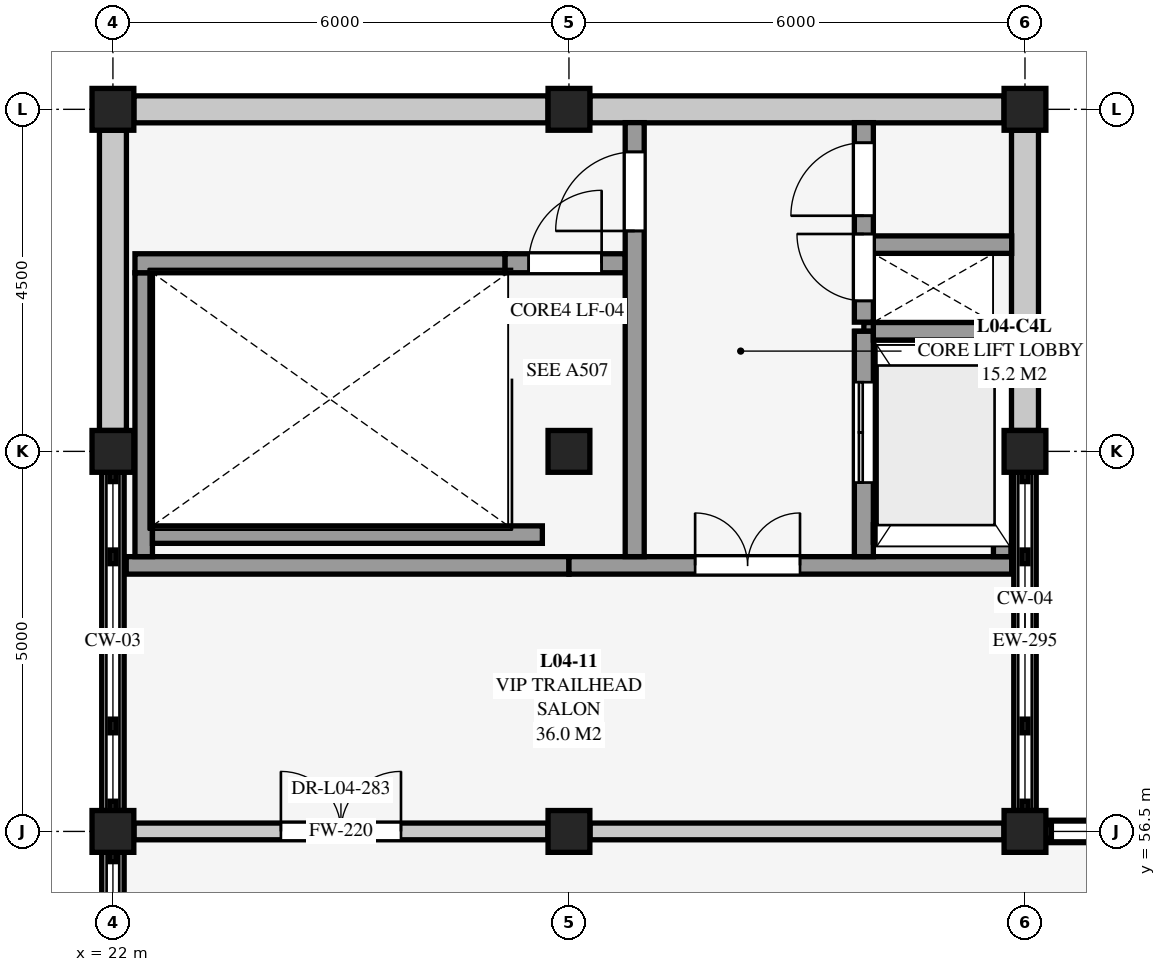
"""IFC4 building model, lengths in metres.
Left out: names, types, materials, properties, quantities, classifications, styles, units other than length and angle.
Written with IfcOpenShell. Run it as: python <this file> out.ifc"""

import sys

from ifc_helpers import new_model, si_unit, direction, frame, frame_2d, origin, origin_2d, place, context, subcontext, project, spatial, rectangle, extrude, element, fill, save


model = new_model("IFC4")
c1 = context("Model", 3, precision=1e-05, world=origin(), true_north=direction((0.0, 1.0)))
c2 = subcontext(c1, "Body", "Model", "MODEL_VIEW")
j1 = project(units=[si_unit("LENGTHUNIT", "METRE"), si_unit("PLANEANGLEUNIT", "RADIAN")], contexts=[c1])
p1 = place(None, origin())
s1 = spatial("IfcSite", under=j1, at=p1, CompositionType="ELEMENT")
p2 = place(p1, origin())
s2 = spatial("IfcBuilding", under=s1, at=p2, CompositionType="ELEMENT")
p3 = place(p2, frame((0.0, 0.0, 13.5)))
s3 = spatial("IfcBuildingStorey", under=s2, at=p3, CompositionType="ELEMENT", Elevation=13.5)
for number, where, z_axis, x_axis in (
    (1, (22.0, 56.5, 0.0), (0.0, 0.0, 1.0), (1.0, 0.0, 0.0)),
    (2, (22.0, 61.5, 0.0), (0.0, 0.0, 1.0), (1.0, 0.0, 0.0)),
    (3, (22.0, 66.0, 0.0), (0.0, 0.0, 1.0), (1.0, 0.0, 0.0)),
    (4, (28.0, 56.5, 0.0), (0.0, 0.0, 1.0), (1.0, 0.0, 0.0)),
    (5, (28.0, 61.5, 0.0), (0.0, 0.0, 1.0), (1.0, 0.0, 0.0)),
    (6, (28.0, 66.0, 0.0), (0.0, 0.0, 1.0), (1.0, 0.0, 0.0)),
    (7, (34.0, 56.5, 0.0), (0.0, 0.0, 1.0), (1.0, 0.0, 0.0)),
    (8, (34.0, 61.5, 0.0), (0.0, 0.0, 1.0), (1.0, 0.0, 0.0)),
    (9, (34.0, 66.0, 0.0), (0.0, 0.0, 1.0), (1.0, 0.0, 0.0)),
):
    element("IfcColumn", number, at=place(p3, frame(where, z_axis=z_axis, x_axis=x_axis)), inside=s3, PredefinedType="COLUMN", context=c2, shape_type="SweptSolid", body=[
        extrude(rectangle(XDim=0.55, YDim=0.55, at=origin_2d()), origin(), (0.0, 0.0, 1.0), 4.5),
    ])
p4 = place(p3, frame((34.275, 56.5, 0.0), z_axis=(0.0, 0.0, 1.0), x_axis=(1.0, 0.0, 0.0)))
e10 = element("IfcWall", 10, at=p4, inside=s3, PredefinedType="SOLIDWALL", context=c2, shape_type="SweptSolid", body=[
    extrude(rectangle(XDim=5.45, YDim=0.295, at=frame_2d((2.725, 0.0))), origin(), (0.0, 0.0, 1.0), 0.41),
])
p5 = place(p3, frame((22.0, 51.275, 0.0), z_axis=(0.0, 0.0, 1.0), x_axis=(0.0, 1.0, 0.0)))
e11 = element("IfcWall", 11, at=p5, inside=s3, PredefinedType="SOLIDWALL", context=c2, shape_type="SweptSolid", body=[
    extrude(rectangle(XDim=4.95, YDim=0.295, at=frame_2d((2.475, 0.0))), origin(), (0.0, 0.0, 1.0), 0.21),
])
for number, where, z_axis, x_axis in (
    (12, (22.275, 66.0, 0.0), (0.0, 0.0, 1.0), (1.0, 0.0, 0.0)),
    (13, (28.275, 66.0, 0.0), (0.0, 0.0, 1.0), (1.0, 0.0, 0.0)),
):
    element("IfcWall", number, at=place(p3, frame(where, z_axis=z_axis, x_axis=x_axis)), inside=s3, PredefinedType="SOLIDWALL", context=c2, shape_type="SweptSolid", body=[
        extrude(rectangle(XDim=5.45, YDim=0.355, at=frame_2d((2.725, 0.0))), origin(), (0.0, 0.0, 1.0), 3.843),
    ])
p6 = place(p3, frame((22.0, 56.775, 0.0), z_axis=(0.0, 0.0, 1.0), x_axis=(0.0, 1.0, 0.0)))
e14 = element("IfcWall", 14, at=p6, inside=s3, PredefinedType="SOLIDWALL", context=c2, shape_type="SweptSolid", body=[
    extrude(rectangle(XDim=4.45, YDim=0.295, at=frame_2d((2.225, 0.0))), origin(), (0.0, 0.0, 1.0), 0.26),
])
p7 = place(p3, frame((34.0, 61.225, 0.0), z_axis=(0.0, 0.0, 1.0), x_axis=(0.0, -1.0, 0.0)))
e15 = element("IfcWall", 15, at=p7, inside=s3, PredefinedType="SOLIDWALL", context=c2, shape_type="SweptSolid", body=[
    extrude(rectangle(XDim=4.45, YDim=0.295, at=frame_2d((2.225, 0.0))), origin(), (0.0, 0.0, 1.0), 0.31),
])
for number, where, z_axis, x_axis in (
    (16, (22.0, 61.775, 0.0), (0.0, 0.0, 1.0), (0.0, 1.0, 0.0)),
    (17, (34.0, 65.725, 0.0), (0.0, 0.0, 1.0), (0.0, -1.0, 0.0)),
):
    element("IfcWall", number, at=place(p3, frame(where, z_axis=z_axis, x_axis=x_axis)), inside=s3, PredefinedType="SOLIDWALL", context=c2, shape_type="SweptSolid", body=[
        extrude(rectangle(XDim=3.95, YDim=0.355, at=frame_2d((1.975, 0.0))), origin(), (0.0, 0.0, 1.0), 3.843),
    ])
p8 = place(p3, frame((31.88, 60.42, 4.5), z_axis=(0.0, 0.0, 1.0), x_axis=(1.0, 0.0, 0.0)))
e18 = element("IfcWall", 18, at=p8, inside=s3, PredefinedType="SHEAR", context=c2, shape_type="SweptSolid", body=[
    extrude(rectangle(XDim=1.82, YDim=0.23, at=frame_2d((0.91, 0.0))), origin(), (0.0, 0.0, 1.0), 1.25),
])
p9 = place(p3, frame((33.7, 60.42, 4.5), z_axis=(0.0, 0.0, 1.0), x_axis=(0.0, 1.0, 0.0)))
e19 = element("IfcWall", 19, at=p9, inside=s3, PredefinedType="SHEAR", context=c2, shape_type="SweptSolid", body=[
    extrude(rectangle(XDim=2.66, YDim=0.23, at=frame_2d((1.33, 0.0))), origin(), (0.0, 0.0, 1.0), 1.25),
])
p10 = place(p3, frame((33.7, 63.08, 4.5), z_axis=(0.0, 0.0, 1.0), x_axis=(-1.0, 0.0, 0.0)))
e20 = element("IfcWall", 20, at=p10, inside=s3, PredefinedType="SHEAR", context=c2, shape_type="SweptSolid", body=[
    extrude(rectangle(XDim=1.82, YDim=0.23, at=frame_2d((0.91, 0.0))), origin(), (0.0, 0.0, 1.0), 1.25),
])
p11 = place(p3, frame((31.88, 63.08, 4.5), z_axis=(0.0, 0.0, 1.0), x_axis=(0.0, -1.0, 0.0)))
e21 = element("IfcWall", 21, at=p11, inside=s3, PredefinedType="SHEAR", context=c2, shape_type="SweptSolid", body=[
    extrude(rectangle(XDim=2.66, YDim=0.23, at=frame_2d((1.33, 0.0))), origin(), (0.0, 0.0, 1.0), 1.25),
])
p12 = place(p3, frame((22.175, 60.0, 0.0), z_axis=(0.0, 0.0, 1.0), x_axis=(1.0, 0.0, 0.0)))
e22 = element("IfcWall", 22, at=p12, inside=s3, PredefinedType="SHEAR", context=c2, shape_type="SweptSolid", body=[
    extrude(rectangle(XDim=5.825, YDim=0.23, at=frame_2d((2.913, 0.0))), origin(), (0.0, 0.0, 1.0), 4.24),
])
p13 = place(p3, frame((28.0, 60.0, 0.0), z_axis=(0.0, 0.0, 1.0), x_axis=(1.0, 0.0, 0.0)))
e23 = element("IfcWall", 23, at=p13, inside=s3, PredefinedType="SHEAR", context=c2, shape_type="SweptSolid", body=[
    extrude(rectangle(XDim=5.825, YDim=0.23, at=frame_2d((2.913, 0.0))), origin(), (0.0, 0.0, 1.0), 4.24),
])
p14 = place(p13, frame((1.66, 0.0, 0.0)))
e24 = element("IfcOpeningElement", 24, at=p14, cuts=e23, PredefinedType="OPENING", context=c2, shape_type="SweptSolid", body=[
    extrude(rectangle(XDim=1.38, YDim=2.16, at=frame_2d((0.69, 1.08))), frame((0.0, 0.125, 0.0), z_axis=(0.0, -1.0, 0.0), x_axis=(1.0, 0.0, 0.0)), (0.0, 0.0, 1.0), 0.25),
])
p15 = place(p3, frame((22.405, 60.115, 0.0), z_axis=(0.0, 0.0, 1.0), x_axis=(0.0, 1.0, 0.0)))
e25 = element("IfcWall", 25, at=p15, inside=s3, PredefinedType="SHEAR", context=c2, shape_type="SweptSolid", body=[
    extrude(rectangle(XDim=3.735, YDim=0.23, at=frame_2d((1.868, 0.0))), origin(), (0.0, 0.0, 1.0), 4.5),
])
p16 = place(p3, frame((22.52, 60.405, 0.0), z_axis=(0.0, 0.0, 1.0), x_axis=(1.0, 0.0, 0.0)))
e26 = element("IfcWall", 26, at=p16, inside=s3, PredefinedType="SHEAR", context=c2, shape_type="SweptSolid", body=[
    extrude(rectangle(XDim=5.13, YDim=0.23, at=frame_2d((2.565, 0.0))), origin(), (0.0, 0.0, 1.0), 4.5),
])
p17 = place(p3, frame((22.29, 63.975, 0.0), z_axis=(0.0, 0.0, 1.0), x_axis=(1.0, 0.0, 0.0)))
e27 = element("IfcWall", 27, at=p17, inside=s3, PredefinedType="SHEAR", context=c2, shape_type="SweptSolid", body=[
    extrude(rectangle(XDim=4.87, YDim=0.25, at=frame_2d((2.435, 0.0))), origin(), (0.0, 0.0, 1.0), 4.5),
])
p18 = place(p3, frame((27.16, 63.975, 0.0), z_axis=(0.0, 0.0, 1.0), x_axis=(1.0, 0.0, 0.0)))
e28 = element("IfcWall", 28, at=p18, inside=s3, PredefinedType="SHEAR", context=c2, shape_type="SweptSolid", body=[
    extrude(rectangle(XDim=1.58, YDim=0.25, at=frame_2d((0.79, 0.0))), origin(), (0.0, 0.0, 1.0), 4.24),
])
p19 = place(p18, frame((0.31, 0.0, 0.0)))
e29 = element("IfcOpeningElement", 29, at=p19, cuts=e28, PredefinedType="OPENING", context=c2, shape_type="SweptSolid", body=[
    extrude(rectangle(XDim=0.96, YDim=2.12, at=frame_2d((0.48, 1.06))), frame((0.0, 0.135, 0.0), z_axis=(0.0, -1.0, 0.0), x_axis=(1.0, 0.0, 0.0)), (0.0, 0.0, 1.0), 0.27),
])
p20 = place(p3, frame((28.865, 60.115, 0.0), z_axis=(0.0, 0.0, 1.0), x_axis=(0.0, 1.0, 0.0)))
e30 = element("IfcWall", 30, at=p20, inside=s3, PredefinedType="SHEAR", context=c2, shape_type="SweptSolid", body=[
    extrude(rectangle(XDim=5.71, YDim=0.25, at=frame_2d((2.855, 0.0))), origin(), (0.0, 0.0, 1.0), 4.24),
])
p21 = place(p20, frame((4.285, 0.0, 0.0)))
e31 = element("IfcOpeningElement", 31, at=p21, cuts=e30, PredefinedType="OPENING", context=c2, shape_type="SweptSolid", body=[
    extrude(rectangle(XDim=1.04, YDim=2.14, at=frame_2d((0.52, 1.07))), frame((0.0, 0.135, 0.0), z_axis=(0.0, -1.0, 0.0), x_axis=(1.0, 0.0, 0.0)), (0.0, 0.0, 1.0), 0.27),
])
p22 = place(p3, frame((31.88, 60.115, 0.0), z_axis=(0.0, 0.0, 1.0), x_axis=(0.0, 1.0, 0.0)))
e32 = element("IfcWall", 32, at=p22, inside=s3, PredefinedType="SHEAR", context=c2, shape_type="SweptSolid", body=[
    extrude(rectangle(XDim=2.965, YDim=0.25, at=frame_2d((1.482, 0.0))), origin(), (0.0, 0.0, 1.0), 4.5),
])
p23 = place(p22, frame((0.975, 0.0, 0.0)))
e33 = element("IfcOpeningElement", 33, at=p23, cuts=e32, PredefinedType="OPENING", context=c2, shape_type="SweptSolid", body=[
    extrude(rectangle(XDim=1.32, YDim=2.2, at=frame_2d((0.66, 1.1))), frame((0.0, 0.135, 0.0), z_axis=(0.0, -1.0, 0.0), x_axis=(1.0, 0.0, 0.0)), (0.0, 0.0, 1.0), 0.27),
])
p24 = place(p3, frame((32.005, 60.42, 0.0), z_axis=(0.0, 0.0, 1.0), x_axis=(1.0, 0.0, 0.0)))
e34 = element("IfcWall", 34, at=p24, inside=s3, PredefinedType="SHEAR", context=c2, shape_type="SweptSolid", body=[
    extrude(rectangle(XDim=1.58, YDim=0.23, at=frame_2d((0.79, 0.0))), origin(), (0.0, 0.0, 1.0), 4.5),
])
p25 = place(p3, frame((33.7, 60.115, 0.0), z_axis=(0.0, 0.0, 1.0), x_axis=(0.0, 1.0, 0.0)))
e35 = element("IfcWall", 35, at=p25, inside=s3, PredefinedType="SHEAR", context=c2, shape_type="SweptSolid", body=[
    extrude(rectangle(XDim=2.965, YDim=0.23, at=frame_2d((1.482, 0.0))), origin(), (0.0, 0.0, 1.0), 4.5),
])
p26 = place(p3, frame((32.005, 63.08, 0.0), z_axis=(0.0, 0.0, 1.0), x_axis=(1.0, 0.0, 0.0)))
e36 = element("IfcWall", 36, at=p26, inside=s3, PredefinedType="SHEAR", context=c2, shape_type="SweptSolid", body=[
    extrude(rectangle(XDim=1.58, YDim=0.23, at=frame_2d((0.79, 0.0))), origin(), (0.0, 0.0, 1.0), 4.5),
])
p27 = place(p3, frame((31.88, 63.2, 0.0), z_axis=(0.0, 0.0, 1.0), x_axis=(0.0, 1.0, 0.0)))
e37 = element("IfcWall", 37, at=p27, inside=s3, PredefinedType="SHEAR", context=c2, shape_type="SweptSolid", body=[
    extrude(rectangle(XDim=2.625, YDim=0.25, at=frame_2d((1.312, 0.0))), origin(), (0.0, 0.0, 1.0), 4.24),
])
p28 = place(p27, frame((0.28, 0.0, 0.0)))
e38 = element("IfcOpeningElement", 38, at=p28, cuts=e37, PredefinedType="OPENING", context=c2, shape_type="SweptSolid", body=[
    extrude(rectangle(XDim=0.88, YDim=2.08, at=frame_2d((0.44, 1.04))), frame((0.0, 0.135, 0.0), z_axis=(0.0, -1.0, 0.0), x_axis=(1.0, 0.0, 0.0)), (0.0, 0.0, 1.0), 0.27),
])
p29 = place(p27, frame((1.4, 0.0, 0.0)))
e39 = element("IfcOpeningElement", 39, at=p29, cuts=e37, PredefinedType="OPENING", context=c2, shape_type="SweptSolid", body=[
    extrude(rectangle(XDim=0.96, YDim=2.12, at=frame_2d((0.48, 1.06))), frame((0.0, 0.135, 0.0), z_axis=(0.0, -1.0, 0.0), x_axis=(1.0, 0.0, 0.0)), (0.0, 0.0, 1.0), 0.27),
])
p30 = place(p3, frame((32.005, 64.22, 0.0), z_axis=(0.0, 0.0, 1.0), x_axis=(1.0, 0.0, 0.0)))
e40 = element("IfcWall", 40, at=p30, inside=s3, PredefinedType="SHEAR", context=c2, shape_type="SweptSolid", body=[
    extrude(rectangle(XDim=1.82, YDim=0.23, at=frame_2d((0.91, 0.0))), origin(), (0.0, 0.0, 1.0), 4.24),
])
p31 = place(p3, frame((22.277, 56.5, 0.0), z_axis=(0.0, 0.0, 1.0), x_axis=(1.0, 0.0, 0.0)))
e41 = element("IfcWall", 41, at=p31, inside=s3, PredefinedType="SOLIDWALL", context=c2, shape_type="SweptSolid", body=[
    extrude(rectangle(XDim=5.446, YDim=0.22, at=frame_2d((2.723, 0.0))), origin(), (0.0, 0.0, 1.0), 3.944),
])
p32 = place(p31, frame((1.933, 0.0, 0.0)))
e42 = element("IfcOpeningElement", 42, at=p32, cuts=e41, PredefinedType="OPENING", context=c2, shape_type="SweptSolid", body=[
    extrude(rectangle(XDim=1.58, YDim=2.2, at=frame_2d((0.79, 1.1))), frame((0.0, 0.12, 0.0), z_axis=(0.0, -1.0, 0.0), x_axis=(1.0, 0.0, 0.0)), (0.0, 0.0, 1.0), 0.24),
])
p33 = place(p3, frame((28.277, 56.5, 0.0), z_axis=(0.0, 0.0, 1.0), x_axis=(1.0, 0.0, 0.0)))
e43 = element("IfcWall", 43, at=p33, inside=s3, PredefinedType="SOLIDWALL", context=c2, shape_type="SweptSolid", body=[
    extrude(rectangle(XDim=5.446, YDim=0.22, at=frame_2d((2.723, 0.0))), origin(), (0.0, 0.0, 1.0), 3.984),
])
p34 = place(p14, origin())
e44 = element("IfcDoor", 44, at=p34, inside=s3, OperationType="DOUBLE_DOOR_SINGLE_SWING", PredefinedType="DOOR", context=c2, shape_type="SweptSolid", body=[
    extrude(rectangle(XDim=1.38, YDim=2.16, at=frame_2d((0.69, 1.08))), frame((0.0, 0.025, 0.0), z_axis=(0.0, -1.0, 0.0), x_axis=(1.0, 0.0, 0.0)), (0.0, 0.0, 1.0), 0.05),
])
fill(e24, e44)
p35 = place(p19, origin())
e45 = element("IfcDoor", 45, at=p35, inside=s3, OperationType="SINGLE_SWING_RIGHT", PredefinedType="DOOR", context=c2, shape_type="SweptSolid", body=[
    extrude(rectangle(XDim=0.96, YDim=2.12, at=frame_2d((0.48, 1.06))), frame((0.0, 0.025, 0.0), z_axis=(0.0, -1.0, 0.0), x_axis=(1.0, 0.0, 0.0)), (0.0, 0.0, 1.0), 0.05),
])
fill(e29, e45)
p36 = place(p21, origin())
e46 = element("IfcDoor", 46, at=p36, inside=s3, OperationType="SINGLE_SWING_LEFT", PredefinedType="DOOR", context=c2, shape_type="SweptSolid", body=[
    extrude(rectangle(XDim=1.04, YDim=2.14, at=frame_2d((0.52, 1.07))), frame((0.0, 0.025, 0.0), z_axis=(0.0, -1.0, 0.0), x_axis=(1.0, 0.0, 0.0)), (0.0, 0.0, 1.0), 0.05),
])
fill(e31, e46)
p37 = place(p23, origin())
e47 = element("IfcDoor", 47, at=p37, inside=s3, OperationType="DOUBLE_DOOR_SLIDING", PredefinedType="DOOR", context=c2, shape_type="SweptSolid", body=[
    extrude(rectangle(XDim=1.32, YDim=2.2, at=frame_2d((0.66, 1.1))), frame((0.0, 0.025, 0.0), z_axis=(0.0, -1.0, 0.0), x_axis=(1.0, 0.0, 0.0)), (0.0, 0.0, 1.0), 0.05),
])
fill(e33, e47)
p38 = place(p28, origin())
e48 = element("IfcDoor", 48, at=p38, inside=s3, OperationType="SINGLE_SWING_RIGHT", PredefinedType="DOOR", context=c2, shape_type="SweptSolid", body=[
    extrude(rectangle(XDim=0.88, YDim=2.08, at=frame_2d((0.44, 1.04))), frame((0.0, 0.025, 0.0), z_axis=(0.0, -1.0, 0.0), x_axis=(1.0, 0.0, 0.0)), (0.0, 0.0, 1.0), 0.05),
])
fill(e38, e48)
p39 = place(p29, origin())
e49 = element("IfcDoor", 49, at=p39, inside=s3, OperationType="SINGLE_SWING_LEFT", PredefinedType="DOOR", context=c2, shape_type="SweptSolid", body=[
    extrude(rectangle(XDim=0.96, YDim=2.12, at=frame_2d((0.48, 1.06))), frame((0.0, 0.025, 0.0), z_axis=(0.0, -1.0, 0.0), x_axis=(1.0, 0.0, 0.0)), (0.0, 0.0, 1.0), 0.05),
])
fill(e39, e49)
p40 = place(p32, origin())
e50 = element("IfcDoor", 50, at=p40, inside=s3, OperationType="DOUBLE_DOOR_SINGLE_SWING", PredefinedType="DOOR", context=c2, shape_type="SweptSolid", body=[
    extrude(rectangle(XDim=1.58, YDim=2.2, at=frame_2d((0.79, 1.1))), frame((0.0, 0.025, 0.0), z_axis=(0.0, -1.0, 0.0), x_axis=(1.0, 0.0, 0.0)), (0.0, 0.0, 1.0), 0.05),
])
fill(e42, e50)
save(model, sys.argv[1])
